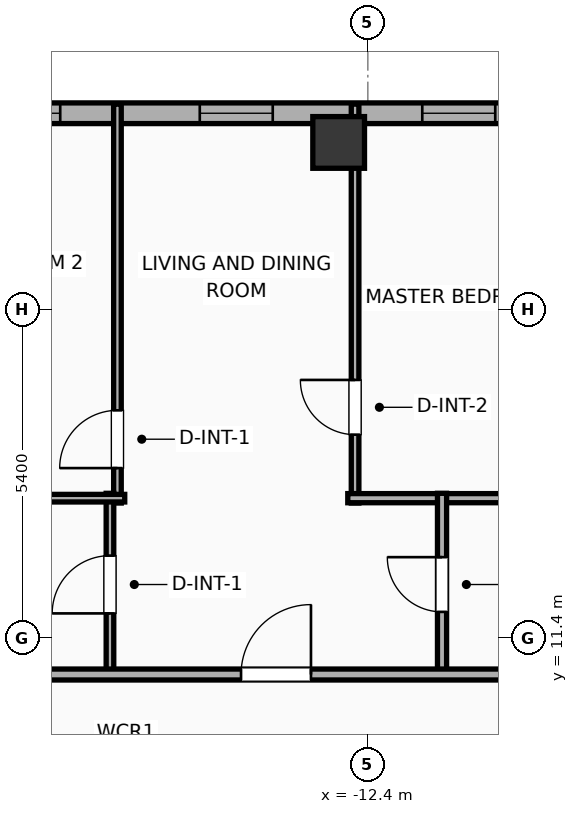
"""IFC4 building model, lengths in metres.
Left out: names, types, materials, properties, quantities, classifications, styles, units other than length and angle.
Written with IfcOpenShell. Run it as: python <this file> out.ifc"""

import sys

from ifc_helpers import new_model, si_unit, direction, frame, frame_2d, origin, origin_2d, place, context, subcontext, project, spatial, rectangle, hollow_rectangle, extrude, element, fill, save


model = new_model("IFC4")
c1 = context("Model", 3, precision=1e-05, world=origin(), true_north=direction((0.0, 1.0)))
c2 = subcontext(c1, "Body", "Model", "MODEL_VIEW")
j1 = project(units=[si_unit("LENGTHUNIT", "METRE"), si_unit("PLANEANGLEUNIT", "RADIAN")], contexts=[c1])
p1 = place(None, origin())
s1 = spatial("IfcSite", under=j1, at=p1, CompositionType="ELEMENT")
p2 = place(p1, origin())
s2 = spatial("IfcBuilding", under=s1, at=p2, CompositionType="ELEMENT")
p3 = place(p2, frame((0.0, 0.0, 223.6)))
s3 = spatial("IfcBuildingStorey", under=s2, at=p3, CompositionType="ELEMENT", Elevation=223.6)
p4 = place(p3, frame((-12.88, 19.55, 0.0), z_axis=(0.0, 0.0, 1.0), x_axis=(1.0, 0.0, 0.0)))
e1 = element("IfcColumn", 1, at=p4, inside=s3, PredefinedType="COLUMN", context=c2, shape_type="SweptSolid", body=[
    extrude(hollow_rectangle(XDim=0.85, YDim=0.85, WallThickness=0.028, at=origin_2d()), origin(), (0.0, 0.0, 1.0), 3.9),
])
p5 = place(p3, frame((-22.783, 20.03, 0.0), z_axis=(0.0, 0.0, 1.0), x_axis=(1.0, 0.0, 0.0)))
e2 = element("IfcWall", 2, at=p5, inside=s3, PredefinedType="ELEMENTEDWALL", context=c2, shape_type="SweptSolid", body=[
    extrude(rectangle(XDim=49.566, YDim=0.34, at=frame_2d((24.783, 0.0))), origin(), (0.0, 0.0, 1.0), 3.65),
])
p6 = place(p5, frame((40.956, 0.0, 0.75)))
e3 = element("IfcOpeningElement", 3, at=p6, cuts=e2, PredefinedType="OPENING", context=c2, shape_type="SweptSolid", body=[
    extrude(rectangle(XDim=2.4, YDim=2.1, at=frame_2d((1.2, 1.05))), frame((0.0, 0.18, 0.0), z_axis=(0.0, -1.0, 0.0), x_axis=(1.0, 0.0, 0.0)), (0.0, 0.0, 1.0), 0.36),
])
p7 = place(p5, frame((1.437, 0.0, 0.75)))
e4 = element("IfcOpeningElement", 4, at=p7, cuts=e2, PredefinedType="OPENING", context=c2, shape_type="SweptSolid", body=[
    extrude(rectangle(XDim=1.2, YDim=2.05, at=frame_2d((0.6, 1.025))), frame((0.0, 0.18, 0.0), z_axis=(0.0, -1.0, 0.0), x_axis=(1.0, 0.0, 0.0)), (0.0, 0.0, 1.0), 0.36),
])
p8 = place(p5, frame((7.619, 0.0, 0.75)))
e5 = element("IfcOpeningElement", 5, at=p8, cuts=e2, PredefinedType="OPENING", context=c2, shape_type="SweptSolid", body=[
    extrude(rectangle(XDim=1.2, YDim=2.05, at=frame_2d((0.6, 1.025))), frame((0.0, 0.18, 0.0), z_axis=(0.0, -1.0, 0.0), x_axis=(1.0, 0.0, 0.0)), (0.0, 0.0, 1.0), 0.36),
])
p9 = place(p5, frame((4.124, 0.0, 0.75)))
e6 = element("IfcOpeningElement", 6, at=p9, cuts=e2, PredefinedType="OPENING", context=c2, shape_type="SweptSolid", body=[
    extrude(rectangle(XDim=1.2, YDim=2.05, at=frame_2d((0.6, 1.025))), frame((0.0, 0.18, 0.0), z_axis=(0.0, -1.0, 0.0), x_axis=(1.0, 0.0, 0.0)), (0.0, 0.0, 1.0), 0.36),
])
p10 = place(p5, frame((11.278, 0.0, 0.75)))
e7 = element("IfcOpeningElement", 7, at=p10, cuts=e2, PredefinedType="OPENING", context=c2, shape_type="SweptSolid", body=[
    extrude(rectangle(XDim=1.2, YDim=2.05, at=frame_2d((0.6, 1.025))), frame((0.0, 0.18, 0.0), z_axis=(0.0, -1.0, 0.0), x_axis=(1.0, 0.0, 0.0)), (0.0, 0.0, 1.0), 0.36),
])
p11 = place(p5, frame((17.953, 0.0, 0.75)))
e8 = element("IfcOpeningElement", 8, at=p11, cuts=e2, PredefinedType="OPENING", context=c2, shape_type="SweptSolid", body=[
    extrude(rectangle(XDim=1.2, YDim=2.05, at=frame_2d((0.6, 1.025))), frame((0.0, 0.18, 0.0), z_axis=(0.0, -1.0, 0.0), x_axis=(1.0, 0.0, 0.0)), (0.0, 0.0, 1.0), 0.36),
])
p12 = place(p5, frame((14.738, 0.0, 0.75)))
e9 = element("IfcOpeningElement", 9, at=p12, cuts=e2, PredefinedType="OPENING", context=c2, shape_type="SweptSolid", body=[
    extrude(rectangle(XDim=1.2, YDim=2.05, at=frame_2d((0.6, 1.025))), frame((0.0, 0.18, 0.0), z_axis=(0.0, -1.0, 0.0), x_axis=(1.0, 0.0, 0.0)), (0.0, 0.0, 1.0), 0.36),
])
p13 = place(p5, frame((21.878, 0.0, 0.75)))
e10 = element("IfcOpeningElement", 10, at=p13, cuts=e2, PredefinedType="OPENING", context=c2, shape_type="SweptSolid", body=[
    extrude(rectangle(XDim=1.2, YDim=2.05, at=frame_2d((0.6, 1.025))), frame((0.0, 0.18, 0.0), z_axis=(0.0, -1.0, 0.0), x_axis=(1.0, 0.0, 0.0)), (0.0, 0.0, 1.0), 0.36),
])
p14 = place(p5, frame((27.878, 0.0, 0.75)))
e11 = element("IfcOpeningElement", 11, at=p14, cuts=e2, PredefinedType="OPENING", context=c2, shape_type="SweptSolid", body=[
    extrude(rectangle(XDim=1.2, YDim=2.05, at=frame_2d((0.6, 1.025))), frame((0.0, 0.18, 0.0), z_axis=(0.0, -1.0, 0.0), x_axis=(1.0, 0.0, 0.0)), (0.0, 0.0, 1.0), 0.36),
])
p15 = place(p5, frame((24.863, 0.0, 0.75)))
e12 = element("IfcOpeningElement", 12, at=p15, cuts=e2, PredefinedType="OPENING", context=c2, shape_type="SweptSolid", body=[
    extrude(rectangle(XDim=1.2, YDim=2.05, at=frame_2d((0.6, 1.025))), frame((0.0, 0.18, 0.0), z_axis=(0.0, -1.0, 0.0), x_axis=(1.0, 0.0, 0.0)), (0.0, 0.0, 1.0), 0.36),
])
p16 = place(p5, frame((32.078, 0.0, 0.75)))
e13 = element("IfcOpeningElement", 13, at=p16, cuts=e2, PredefinedType="OPENING", context=c2, shape_type="SweptSolid", body=[
    extrude(rectangle(XDim=1.2, YDim=2.05, at=frame_2d((0.6, 1.025))), frame((0.0, 0.18, 0.0), z_axis=(0.0, -1.0, 0.0), x_axis=(1.0, 0.0, 0.0)), (0.0, 0.0, 1.0), 0.36),
])
p17 = place(p5, frame((35.216, 0.0, 0.75)))
e14 = element("IfcOpeningElement", 14, at=p17, cuts=e2, PredefinedType="OPENING", context=c2, shape_type="SweptSolid", body=[
    extrude(rectangle(XDim=1.2, YDim=2.05, at=frame_2d((0.6, 1.025))), frame((0.0, 0.18, 0.0), z_axis=(0.0, -1.0, 0.0), x_axis=(1.0, 0.0, 0.0)), (0.0, 0.0, 1.0), 0.36),
])
p18 = place(p5, frame((45.73, 0.0, 0.75)))
e15 = element("IfcOpeningElement", 15, at=p18, cuts=e2, PredefinedType="OPENING", context=c2, shape_type="SweptSolid", body=[
    extrude(rectangle(XDim=1.2, YDim=2.05, at=frame_2d((0.6, 1.025))), frame((0.0, 0.18, 0.0), z_axis=(0.0, -1.0, 0.0), x_axis=(1.0, 0.0, 0.0)), (0.0, 0.0, 1.0), 0.36),
])
p19 = place(p3, frame((-16.518, 13.62, 0.0), z_axis=(0.0, 0.0, 1.0), x_axis=(0.0, 1.0, 0.0)))
e16 = element("IfcWall", 16, at=p19, inside=s3, PredefinedType="PARTITIONING", context=c2, shape_type="SweptSolid", body=[
    extrude(rectangle(XDim=6.56, YDim=0.125, at=frame_2d((3.28, 0.0))), origin(), (0.0, 0.0, 1.0), 3.65),
])
p20 = place(p19, frame((0.575, 0.0, 0.0)))
e17 = element("IfcOpeningElement", 17, at=p20, cuts=e16, PredefinedType="OPENING", context=c2, shape_type="SweptSolid", body=[
    extrude(rectangle(XDim=0.95, YDim=2.05, at=frame_2d((0.475, 1.025))), frame((0.0, 0.073, 0.0), z_axis=(0.0, -1.0, 0.0), x_axis=(1.0, 0.0, 0.0)), (0.0, 0.0, 1.0), 0.145),
])
p21 = place(p3, frame((-12.61, 13.62, 0.0), z_axis=(0.0, 0.0, 1.0), x_axis=(0.0, 1.0, 0.0)))
e18 = element("IfcWall", 18, at=p21, inside=s3, PredefinedType="PARTITIONING", context=c2, shape_type="SweptSolid", body=[
    extrude(rectangle(XDim=6.56, YDim=0.125, at=frame_2d((3.28, 0.0))), origin(), (0.0, 0.0, 1.0), 3.09),
])
p22 = place(p21, frame((1.125, 0.0, 0.0)))
e19 = element("IfcOpeningElement", 19, at=p22, cuts=e18, PredefinedType="OPENING", context=c2, shape_type="SweptSolid", body=[
    extrude(rectangle(XDim=0.9, YDim=2.05, at=frame_2d((0.45, 1.025))), frame((0.0, 0.073, 0.0), z_axis=(0.0, -1.0, 0.0), x_axis=(1.0, 0.0, 0.0)), (0.0, 0.0, 1.0), 0.145),
])
p23 = place(p3, frame((-12.73, 13.7, 0.0), z_axis=(0.0, 0.0, 1.0), x_axis=(1.0, 0.0, 0.0)))
e20 = element("IfcWall", 20, at=p23, inside=s3, PredefinedType="PLUMBINGWALL", context=c2, shape_type="SweptSolid", body=[
    extrude(rectangle(XDim=3.79, YDim=0.15, at=frame_2d((1.895, 0.0))), origin(), (0.0, 0.0, 1.0), 3.65),
])
p24 = place(p3, frame((-16.641, 10.78, 0.0), z_axis=(0.0, 0.0, 1.0), x_axis=(0.0, 1.0, 0.0)))
e21 = element("IfcWall", 21, at=p24, inside=s3, PredefinedType="PARTITIONING", context=c2, shape_type="SweptSolid", body=[
    extrude(rectangle(XDim=3.0, YDim=0.125, at=frame_2d((1.5, 0.0))), origin(), (0.0, 0.0, 1.0), 3.65),
])
p25 = place(p24, frame((1.025, 0.0, 0.0)))
e22 = element("IfcOpeningElement", 22, at=p25, cuts=e21, PredefinedType="OPENING", context=c2, shape_type="SweptSolid", body=[
    extrude(rectangle(XDim=0.95, YDim=2.05, at=frame_2d((0.475, 1.025))), frame((0.0, 0.073, 0.0), z_axis=(0.0, -1.0, 0.0), x_axis=(1.0, 0.0, 0.0)), (0.0, 0.0, 1.0), 0.145),
])
p26 = place(p3, frame((-19.86, 13.7, 0.0), z_axis=(0.0, 0.0, 1.0), x_axis=(1.0, 0.0, 0.0)))
e23 = element("IfcWall", 23, at=p26, inside=s3, PredefinedType="PARTITIONING", context=c2, shape_type="SweptSolid", body=[
    extrude(rectangle(XDim=3.462, YDim=0.125, at=frame_2d((1.731, 0.0))), origin(), (0.0, 0.0, 1.0), 3.65),
])
p27 = place(p3, frame((-11.18, 10.78, 0.0), z_axis=(0.0, 0.0, 1.0), x_axis=(0.0, 1.0, 0.0)))
e24 = element("IfcWall", 24, at=p27, inside=s3, PredefinedType="PLUMBINGWALL", context=c2, shape_type="SweptSolid", body=[
    extrude(rectangle(XDim=3.0, YDim=0.15, at=frame_2d((1.5, 0.0))), origin(), (0.0, 0.0, 1.0), 3.65),
])
p28 = place(p27, frame((1.05, 0.0, 0.0)))
e25 = element("IfcOpeningElement", 25, at=p28, cuts=e24, PredefinedType="OPENING", context=c2, shape_type="SweptSolid", body=[
    extrude(rectangle(XDim=0.9, YDim=2.05, at=frame_2d((0.45, 1.025))), frame((0.0, 0.085, 0.0), z_axis=(0.0, -1.0, 0.0), x_axis=(1.0, 0.0, 0.0)), (0.0, 0.0, 1.0), 0.17),
])
p29 = place(p3, frame((-26.23, 10.8, 0.0), z_axis=(0.0, 0.0, 1.0), x_axis=(1.0, 0.0, 0.0)))
e26 = element("IfcWall", 26, at=p29, inside=s3, PredefinedType="PARTITIONING", context=c2, shape_type="SweptSolid", body=[
    extrude(rectangle(XDim=56.46, YDim=0.18, at=frame_2d((28.23, 0.0))), origin(), (0.0, 0.0, 1.0), 3.65),
])
p30 = place(p29, frame((2.994, 0.0, 0.0)))
e27 = element("IfcOpeningElement", 27, at=p30, cuts=e26, PredefinedType="OPENING", context=c2, shape_type="SweptSolid", body=[
    extrude(rectangle(XDim=0.9, YDim=2.05, at=frame_2d((0.45, 1.025))), frame((0.0, 0.1, 0.0), z_axis=(0.0, -1.0, 0.0), x_axis=(1.0, 0.0, 0.0)), (0.0, 0.0, 1.0), 0.2),
])
p31 = place(p29, frame((11.745, 0.0, 0.0)))
e28 = element("IfcOpeningElement", 28, at=p31, cuts=e26, PredefinedType="OPENING", context=c2, shape_type="SweptSolid", body=[
    extrude(rectangle(XDim=1.15, YDim=2.05, at=frame_2d((0.575, 1.025))), frame((0.0, 0.1, 0.0), z_axis=(0.0, -1.0, 0.0), x_axis=(1.0, 0.0, 0.0)), (0.0, 0.0, 1.0), 0.2),
])
p32 = place(p29, frame((21.907, 0.0, 0.0)))
e29 = element("IfcOpeningElement", 29, at=p32, cuts=e26, PredefinedType="OPENING", context=c2, shape_type="SweptSolid", body=[
    extrude(rectangle(XDim=1.15, YDim=2.05, at=frame_2d((0.575, 1.025))), frame((0.0, 0.1, 0.0), z_axis=(0.0, -1.0, 0.0), x_axis=(1.0, 0.0, 0.0)), (0.0, 0.0, 1.0), 0.2),
])
p33 = place(p29, frame((32.516, 0.0, 0.0)))
e30 = element("IfcOpeningElement", 30, at=p33, cuts=e26, PredefinedType="OPENING", context=c2, shape_type="SweptSolid", body=[
    extrude(rectangle(XDim=1.15, YDim=2.05, at=frame_2d((0.575, 1.025))), frame((0.0, 0.1, 0.0), z_axis=(0.0, -1.0, 0.0), x_axis=(1.0, 0.0, 0.0)), (0.0, 0.0, 1.0), 0.2),
])
p34 = place(p29, frame((41.956, 0.0, 0.0)))
e31 = element("IfcOpeningElement", 31, at=p34, cuts=e26, PredefinedType="OPENING", context=c2, shape_type="SweptSolid", body=[
    extrude(rectangle(XDim=1.15, YDim=2.05, at=frame_2d((0.575, 1.025))), frame((0.0, 0.1, 0.0), z_axis=(0.0, -1.0, 0.0), x_axis=(1.0, 0.0, 0.0)), (0.0, 0.0, 1.0), 0.2),
])
p35 = place(p29, frame((51.656, 0.0, 0.0)))
e32 = element("IfcOpeningElement", 32, at=p35, cuts=e26, PredefinedType="OPENING", context=c2, shape_type="SweptSolid", body=[
    extrude(rectangle(XDim=1.15, YDim=2.05, at=frame_2d((0.575, 1.025))), frame((0.0, 0.1, 0.0), z_axis=(0.0, -1.0, 0.0), x_axis=(1.0, 0.0, 0.0)), (0.0, 0.0, 1.0), 0.2),
])
p36 = place(p8, origin())
e33 = element("IfcWindow", 33, at=p36, inside=s3, PartitioningType="SINGLE_PANEL", PredefinedType="WINDOW", context=c2, shape_type="SweptSolid", body=[
    extrude(rectangle(XDim=1.2, YDim=2.05, at=frame_2d((0.6, 1.025))), frame((0.0, 0.03, 0.0), z_axis=(0.0, -1.0, 0.0), x_axis=(1.0, 0.0, 0.0)), (0.0, 0.0, 1.0), 0.06),
])
fill(e5, e33)
p37 = place(p9, origin())
e34 = element("IfcWindow", 34, at=p37, inside=s3, PartitioningType="SINGLE_PANEL", PredefinedType="WINDOW", context=c2, shape_type="SweptSolid", body=[
    extrude(rectangle(XDim=1.2, YDim=2.05, at=frame_2d((0.6, 1.025))), frame((0.0, 0.03, 0.0), z_axis=(0.0, -1.0, 0.0), x_axis=(1.0, 0.0, 0.0)), (0.0, 0.0, 1.0), 0.06),
])
fill(e6, e34)
p38 = place(p10, origin())
e35 = element("IfcWindow", 35, at=p38, inside=s3, PartitioningType="SINGLE_PANEL", PredefinedType="WINDOW", context=c2, shape_type="SweptSolid", body=[
    extrude(rectangle(XDim=1.2, YDim=2.05, at=frame_2d((0.6, 1.025))), frame((0.0, 0.03, 0.0), z_axis=(0.0, -1.0, 0.0), x_axis=(1.0, 0.0, 0.0)), (0.0, 0.0, 1.0), 0.06),
])
fill(e7, e35)
p39 = place(p20, origin())
e36 = element("IfcDoor", 36, at=p39, inside=s3, OperationType="SINGLE_SWING_LEFT", PredefinedType="DOOR", context=c2, shape_type="SweptSolid", body=[
    extrude(rectangle(XDim=0.95, YDim=2.05, at=frame_2d((0.475, 1.025))), frame((0.0, 0.025, 0.0), z_axis=(0.0, -1.0, 0.0), x_axis=(1.0, 0.0, 0.0)), (0.0, 0.0, 1.0), 0.05),
])
fill(e17, e36)
p40 = place(p22, origin())
e37 = element("IfcDoor", 37, at=p40, inside=s3, OperationType="SINGLE_SWING_RIGHT", PredefinedType="DOOR", context=c2, shape_type="SweptSolid", body=[
    extrude(rectangle(XDim=0.9, YDim=2.05, at=frame_2d((0.45, 1.025))), frame((0.0, 0.025, 0.0), z_axis=(0.0, -1.0, 0.0), x_axis=(1.0, 0.0, 0.0)), (0.0, 0.0, 1.0), 0.05),
])
fill(e19, e37)
p41 = place(p25, origin())
e38 = element("IfcDoor", 38, at=p41, inside=s3, OperationType="SINGLE_SWING_LEFT", PredefinedType="DOOR", context=c2, shape_type="SweptSolid", body=[
    extrude(rectangle(XDim=0.95, YDim=2.05, at=frame_2d((0.475, 1.025))), frame((0.0, 0.025, 0.0), z_axis=(0.0, -1.0, 0.0), x_axis=(1.0, 0.0, 0.0)), (0.0, 0.0, 1.0), 0.05),
])
fill(e22, e38)
p42 = place(p28, origin())
e39 = element("IfcDoor", 39, at=p42, inside=s3, OperationType="SINGLE_SWING_RIGHT", PredefinedType="DOOR", context=c2, shape_type="SweptSolid", body=[
    extrude(rectangle(XDim=0.9, YDim=2.05, at=frame_2d((0.45, 1.025))), frame((0.0, 0.025, 0.0), z_axis=(0.0, -1.0, 0.0), x_axis=(1.0, 0.0, 0.0)), (0.0, 0.0, 1.0), 0.05),
])
fill(e25, e39)
p43 = place(p31, origin())
e40 = element("IfcDoor", 40, at=p43, inside=s3, OperationType="SINGLE_SWING_RIGHT", PredefinedType="DOOR", context=c2, shape_type="SweptSolid", body=[
    extrude(rectangle(XDim=1.15, YDim=2.05, at=frame_2d((0.575, 1.025))), frame((0.0, 0.025, 0.0), z_axis=(0.0, -1.0, 0.0), x_axis=(1.0, 0.0, 0.0)), (0.0, 0.0, 1.0), 0.05),
])
fill(e28, e40)
save(model, sys.argv[1])
